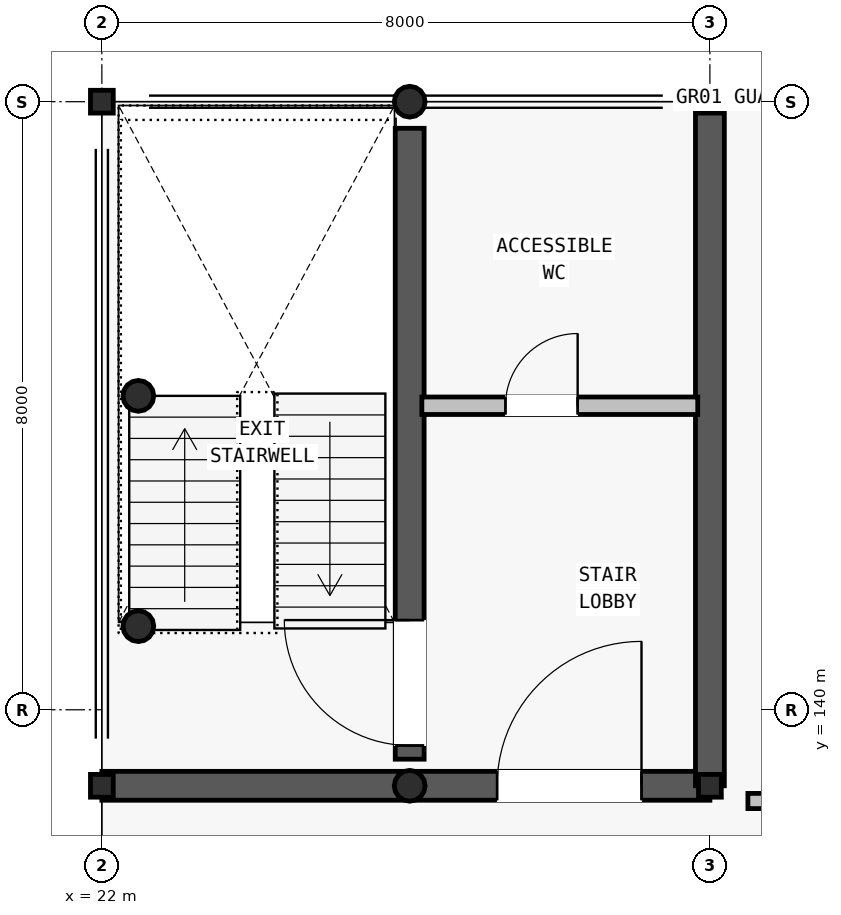
"""IFC4 building model, lengths in metres.
Left out: names, types, materials, properties, quantities, classifications, styles, units other than length and angle.
Written with IfcOpenShell. Run it as: python <this file> out.ifc"""

import sys

from ifc_helpers import new_model, si_unit, direction, frame, frame_2d, origin, origin_2d, place, context, subcontext, project, spatial, rectangle, hollow_circle, i_section, extrude, element, fill, save


model = new_model("IFC4")
c1 = context("Model", 3, precision=1e-05, world=origin(), true_north=direction((0.0, 1.0)))
c2 = subcontext(c1, "Body", "Model", "MODEL_VIEW")
j1 = project(units=[si_unit("LENGTHUNIT", "METRE"), si_unit("PLANEANGLEUNIT", "RADIAN")], contexts=[c1])
p1 = place(None, origin())
s1 = spatial("IfcSite", under=j1, at=p1, CompositionType="ELEMENT")
p2 = place(p1, origin())
s2 = spatial("IfcBuilding", under=s1, at=p2, CompositionType="ELEMENT")
p3 = place(p2, frame((0.0, 0.0, 21.2)))
s3 = spatial("IfcBuildingStorey", under=s2, at=p3, CompositionType="ELEMENT", Elevation=21.2)
for number, where, z_axis, x_axis in (
    (1, (22.0, 148.0, 0.0), (0.0, 0.0, 1.0), (1.0, 0.0, 0.0)),
    (2, (30.0, 148.0, 0.0), (0.0, 0.0, 1.0), (1.0, 0.0, 0.0)),
    (3, (22.0, 139.0, 0.0), (0.0, 0.0, 1.0), (1.0, 0.0, 0.0)),
    (4, (30.0, 139.0, 0.0), (0.0, 0.0, 1.0), (1.0, 0.0, 0.0)),
):
    element("IfcColumn", number, at=place(p3, frame(where, z_axis=z_axis, x_axis=x_axis)), inside=s3, PredefinedType="COLUMN", context=c2, shape_type="SweptSolid", body=[
        extrude(i_section(OverallWidth=0.3, OverallDepth=0.3, WebThickness=0.01, FlangeThickness=0.015, FilletRadius=0.018, at=origin_2d()), origin(), (0.0, 0.0, 1.0), 3.9),
    ])
for number, where, z_axis, x_axis in (
    (5, (26.05, 139.0, 0.0), (0.0, 0.0, 1.0), (1.0, 0.0, 0.0)),
    (6, (26.05, 148.0, 0.0), (0.0, 0.0, 1.0), (1.0, 0.0, 0.0)),
    (7, (22.48, 141.1, 0.0), (0.0, 0.0, 1.0), (1.0, 0.0, 0.0)),
    (8, (22.48, 144.13, 0.0), (0.0, 0.0, 1.0), (1.0, 0.0, 0.0)),
):
    element("IfcColumn", number, at=place(p3, frame(where, z_axis=z_axis, x_axis=x_axis)), inside=s3, PredefinedType="COLUMN", context=c2, shape_type="SweptSolid", body=[
        extrude(hollow_circle(Radius=0.203, WallThickness=0.014, at=origin_2d()), origin(), (0.0, 0.0, 1.0), 3.9),
    ])
p4 = place(p3, frame((22.0, 139.0, 0.0), z_axis=(0.0, 0.0, 1.0), x_axis=(1.0, 0.0, 0.0)))
e9 = element("IfcWall", 9, at=p4, inside=s3, PredefinedType="SHEAR", context=c2, shape_type="SweptSolid", body=[
    extrude(rectangle(XDim=8.0, YDim=0.38, at=frame_2d((4.0, 0.0))), origin(), (0.0, 0.0, 1.0), 3.62),
])
p5 = place(p4, frame((5.2, 0.0, 0.0)))
e10 = element("IfcOpeningElement", 10, at=p5, cuts=e9, PredefinedType="OPENING", context=c2, shape_type="SweptSolid", body=[
    extrude(rectangle(XDim=1.9, YDim=2.3, at=frame_2d((0.95, 1.15))), frame((0.0, 0.2, 0.0), z_axis=(0.0, -1.0, 0.0), x_axis=(1.0, 0.0, 0.0)), (0.0, 0.0, 1.0), 0.4),
])
p6 = place(p3, frame((30.0, 139.0, 0.0), z_axis=(0.0, 0.0, 1.0), x_axis=(0.0, 1.0, 0.0)))
e11 = element("IfcWall", 11, at=p6, inside=s3, PredefinedType="SHEAR", context=c2, shape_type="SweptSolid", body=[
    extrude(rectangle(XDim=9.0, YDim=0.38, at=frame_2d((4.5, 0.0))), origin(), (0.0, 0.0, 1.0), 3.62),
])
p7 = place(p3, frame((26.05, 139.35, 0.0), z_axis=(0.0, 0.0, 1.0), x_axis=(0.0, 1.0, 0.0)))
e12 = element("IfcWall", 12, at=p7, inside=s3, PredefinedType="SHEAR", context=c2, shape_type="SweptSolid", body=[
    extrude(rectangle(XDim=8.3, YDim=0.38, at=frame_2d((4.15, 0.0))), origin(), (0.0, 0.0, 1.0), 3.62),
])
p8 = place(p7, frame((0.18, 0.0, 0.0)))
e13 = element("IfcOpeningElement", 13, at=p8, cuts=e12, PredefinedType="OPENING", context=c2, shape_type="SweptSolid", body=[
    extrude(rectangle(XDim=1.65, YDim=2.2, at=frame_2d((0.825, 1.1))), frame((0.0, 0.2, 0.0), z_axis=(0.0, -1.0, 0.0), x_axis=(1.0, 0.0, 0.0)), (0.0, 0.0, 1.0), 0.4),
])
p9 = place(p3, frame((26.21, 144.0, 0.0), z_axis=(0.0, 0.0, 1.0), x_axis=(1.0, 0.0, 0.0)))
e14 = element("IfcWall", 14, at=p9, inside=s3, PredefinedType="PARTITIONING", context=c2, shape_type="SweptSolid", body=[
    extrude(rectangle(XDim=3.63, YDim=0.23, at=frame_2d((1.815, 0.0))), origin(), (0.0, 0.0, 1.0), 2.48),
])
p10 = place(p9, frame((1.1, 0.0, 0.0)))
e15 = element("IfcOpeningElement", 15, at=p10, cuts=e14, PredefinedType="OPENING", context=c2, shape_type="SweptSolid", body=[
    extrude(rectangle(XDim=0.95, YDim=2.1, at=frame_2d((0.475, 1.05))), frame((0.0, 0.125, 0.0), z_axis=(0.0, -1.0, 0.0), x_axis=(1.0, 0.0, 0.0)), (0.0, 0.0, 1.0), 0.25),
])
p11 = place(p3, frame((30.5, 138.8, 0.0), z_axis=(0.0, 0.0, 1.0), x_axis=(1.0, 0.0, 0.0)))
e16 = element("IfcWall", 16, at=p11, inside=s3, PredefinedType="PARTITIONING", context=c2, shape_type="SweptSolid", body=[
    extrude(rectangle(XDim=65.0, YDim=0.2, at=frame_2d((32.5, 0.0))), origin(), (0.0, 0.0, 1.0), 2.48),
])
p12 = place(p11, frame((20.0, 0.0, 0.0)))
e17 = element("IfcOpeningElement", 17, at=p12, cuts=e16, PredefinedType="OPENING", context=c2, shape_type="SweptSolid", body=[
    extrude(rectangle(XDim=1.75, YDim=2.25, at=frame_2d((0.875, 1.125))), frame((0.0, 0.11, 0.0), z_axis=(0.0, -1.0, 0.0), x_axis=(1.0, 0.0, 0.0)), (0.0, 0.0, 1.0), 0.22),
])
p13 = place(p5, origin())
e18 = element("IfcDoor", 18, at=p13, inside=s3, OperationType="SINGLE_SWING_RIGHT", PredefinedType="DOOR", context=c2, shape_type="SweptSolid", body=[
    extrude(rectangle(XDim=1.9, YDim=2.3, at=frame_2d((0.95, 1.15))), frame((0.0, 0.025, 0.0), z_axis=(0.0, -1.0, 0.0), x_axis=(1.0, 0.0, 0.0)), (0.0, 0.0, 1.0), 0.05),
])
fill(e10, e18)
p14 = place(p8, origin())
e19 = element("IfcDoor", 19, at=p14, inside=s3, OperationType="SINGLE_SWING_RIGHT", PredefinedType="DOOR", context=c2, shape_type="SweptSolid", body=[
    extrude(rectangle(XDim=1.65, YDim=2.2, at=frame_2d((0.825, 1.1))), frame((0.0, 0.025, 0.0), z_axis=(0.0, -1.0, 0.0), x_axis=(1.0, 0.0, 0.0)), (0.0, 0.0, 1.0), 0.05),
])
fill(e13, e19)
p15 = place(p10, origin())
e20 = element("IfcDoor", 20, at=p15, inside=s3, OperationType="SINGLE_SWING_RIGHT", PredefinedType="DOOR", context=c2, shape_type="SweptSolid", body=[
    extrude(rectangle(XDim=0.95, YDim=2.1, at=frame_2d((0.475, 1.05))), frame((0.0, 0.025, 0.0), z_axis=(0.0, -1.0, 0.0), x_axis=(1.0, 0.0, 0.0)), (0.0, 0.0, 1.0), 0.05),
])
fill(e15, e20)
save(model, sys.argv[1])
